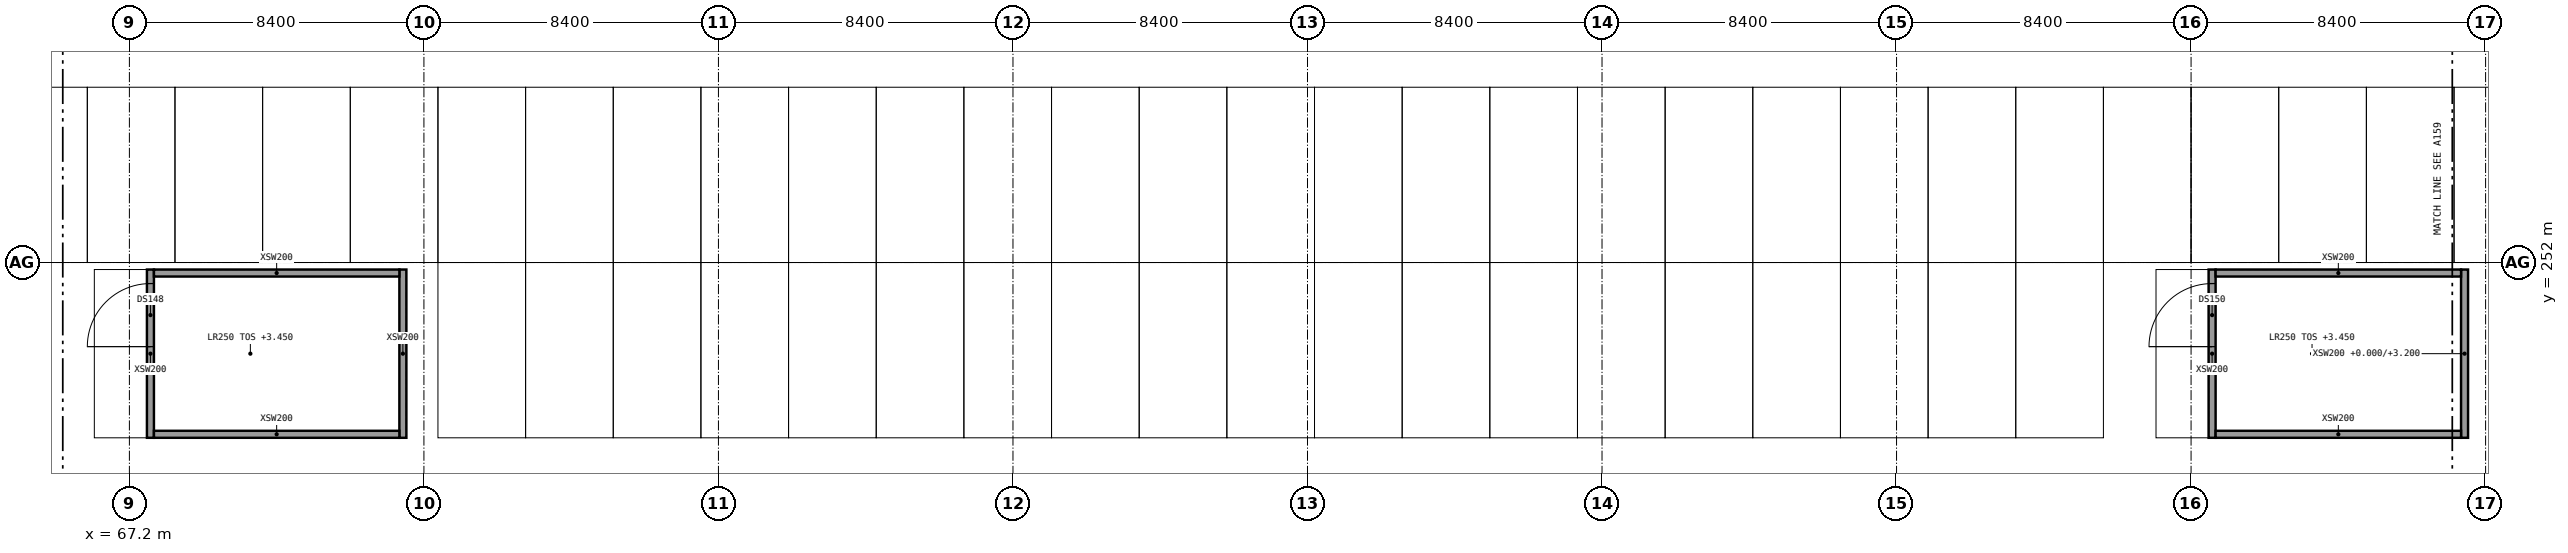
"""IFC4 building model, lengths in metres.
Left out: names, types, materials, properties, quantities, classifications, styles, units other than length and angle.
Written with IfcOpenShell. Run it as: python <this file> out.ifc"""

import sys

from ifc_helpers import new_model, si_unit, direction, frame, frame_2d, origin, place, context, subcontext, project, spatial, rectangle, extrude, element, fill, save


model = new_model("IFC4")
c1 = context("Model", 3, precision=1e-05, world=origin(), true_north=direction((0.0, 1.0)))
c2 = subcontext(c1, "Body", "Model", "MODEL_VIEW")
j1 = project(units=[si_unit("LENGTHUNIT", "METRE"), si_unit("PLANEANGLEUNIT", "RADIAN")], contexts=[c1])
p1 = place(None, origin())
s1 = spatial("IfcSite", under=j1, at=p1, CompositionType="ELEMENT")
p2 = place(p1, origin())
s2 = spatial("IfcBuilding", under=s1, at=p2, CompositionType="ELEMENT")
p3 = place(p2, origin())
s3 = spatial("IfcBuildingStorey", under=s2, at=p3, CompositionType="ELEMENT", Elevation=0.0)
p4 = place(p3, frame((67.8, 247.0, 0.0), z_axis=(0.0, 0.0, 1.0), x_axis=(0.0, 1.0, 0.0)))
e1 = element("IfcWall", 1, at=p4, inside=s3, PredefinedType="SOLIDWALL", context=c2, shape_type="SweptSolid", body=[
    extrude(rectangle(XDim=4.8, YDim=0.2, at=frame_2d((2.4, 0.0))), origin(), (0.0, 0.0, 1.0), 3.2),
])
p5 = place(p4, frame((2.6, 0.0, 0.0)))
e2 = element("IfcOpeningElement", 2, at=p5, cuts=e1, PredefinedType="OPENING", context=c2, shape_type="SweptSolid", body=[
    extrude(rectangle(XDim=1.8, YDim=2.1, at=frame_2d((0.9, 1.05))), frame((0.0, 0.1, 0.0), z_axis=(0.0, -1.0, 0.0), x_axis=(1.0, 0.0, 0.0)), (0.0, 0.0, 1.0), 0.2),
])
p6 = place(p3, frame((75.0, 247.0, 0.0), z_axis=(0.0, 0.0, 1.0), x_axis=(0.0, 1.0, 0.0)))
e3 = element("IfcWall", 3, at=p6, inside=s3, PredefinedType="SOLIDWALL", context=c2, shape_type="SweptSolid", body=[
    extrude(rectangle(XDim=4.8, YDim=0.2, at=frame_2d((2.4, 0.0))), origin(), (0.0, 0.0, 1.0), 3.2),
])
for number, where, z_axis, x_axis in (
    (4, (67.9, 247.1, 0.0), (0.0, 0.0, 1.0), (1.0, 0.0, 0.0)),
    (5, (67.9, 251.7, 0.0), (0.0, 0.0, 1.0), (1.0, 0.0, 0.0)),
):
    element("IfcWall", number, at=place(p3, frame(where, z_axis=z_axis, x_axis=x_axis)), inside=s3, PredefinedType="SOLIDWALL", context=c2, shape_type="SweptSolid", body=[
        extrude(rectangle(XDim=7.0, YDim=0.2, at=frame_2d((3.5, 0.0))), origin(), (0.0, 0.0, 1.0), 3.2),
    ])
p7 = place(p3, frame((126.6, 247.0, 0.0), z_axis=(0.0, 0.0, 1.0), x_axis=(0.0, 1.0, 0.0)))
e6 = element("IfcWall", 6, at=p7, inside=s3, PredefinedType="SOLIDWALL", context=c2, shape_type="SweptSolid", body=[
    extrude(rectangle(XDim=4.8, YDim=0.2, at=frame_2d((2.4, 0.0))), origin(), (0.0, 0.0, 1.0), 3.2),
])
p8 = place(p7, frame((2.6, 0.0, 0.0)))
e7 = element("IfcOpeningElement", 7, at=p8, cuts=e6, PredefinedType="OPENING", context=c2, shape_type="SweptSolid", body=[
    extrude(rectangle(XDim=1.8, YDim=2.1, at=frame_2d((0.9, 1.05))), frame((0.0, 0.1, 0.0), z_axis=(0.0, -1.0, 0.0), x_axis=(1.0, 0.0, 0.0)), (0.0, 0.0, 1.0), 0.2),
])
p9 = place(p3, frame((133.8, 247.0, 0.0), z_axis=(0.0, 0.0, 1.0), x_axis=(0.0, 1.0, 0.0)))
e8 = element("IfcWall", 8, at=p9, inside=s3, PredefinedType="SOLIDWALL", context=c2, shape_type="SweptSolid", body=[
    extrude(rectangle(XDim=4.8, YDim=0.2, at=frame_2d((2.4, 0.0))), origin(), (0.0, 0.0, 1.0), 3.2),
])
for number, where, z_axis, x_axis in (
    (9, (126.7, 247.1, 0.0), (0.0, 0.0, 1.0), (1.0, 0.0, 0.0)),
    (10, (126.7, 251.7, 0.0), (0.0, 0.0, 1.0), (1.0, 0.0, 0.0)),
):
    element("IfcWall", number, at=place(p3, frame(where, z_axis=z_axis, x_axis=x_axis)), inside=s3, PredefinedType="SOLIDWALL", context=c2, shape_type="SweptSolid", body=[
        extrude(rectangle(XDim=7.0, YDim=0.2, at=frame_2d((3.5, 0.0))), origin(), (0.0, 0.0, 1.0), 3.2),
    ])
p10 = place(p5, origin())
e11 = element("IfcDoor", 11, at=p10, inside=s3, OperationType="SINGLE_SWING_LEFT", PredefinedType="DOOR", context=c2, shape_type="SweptSolid", body=[
    extrude(rectangle(XDim=1.8, YDim=2.1, at=frame_2d((0.9, 1.05))), frame((0.0, 0.025, 0.0), z_axis=(0.0, -1.0, 0.0), x_axis=(1.0, 0.0, 0.0)), (0.0, 0.0, 1.0), 0.05),
])
fill(e2, e11)
p11 = place(p8, origin())
e12 = element("IfcDoor", 12, at=p11, inside=s3, OperationType="SINGLE_SWING_LEFT", PredefinedType="DOOR", context=c2, shape_type="SweptSolid", body=[
    extrude(rectangle(XDim=1.8, YDim=2.1, at=frame_2d((0.9, 1.05))), frame((0.0, 0.025, 0.0), z_axis=(0.0, -1.0, 0.0), x_axis=(1.0, 0.0, 0.0)), (0.0, 0.0, 1.0), 0.05),
])
fill(e7, e12)
save(model, sys.argv[1])
